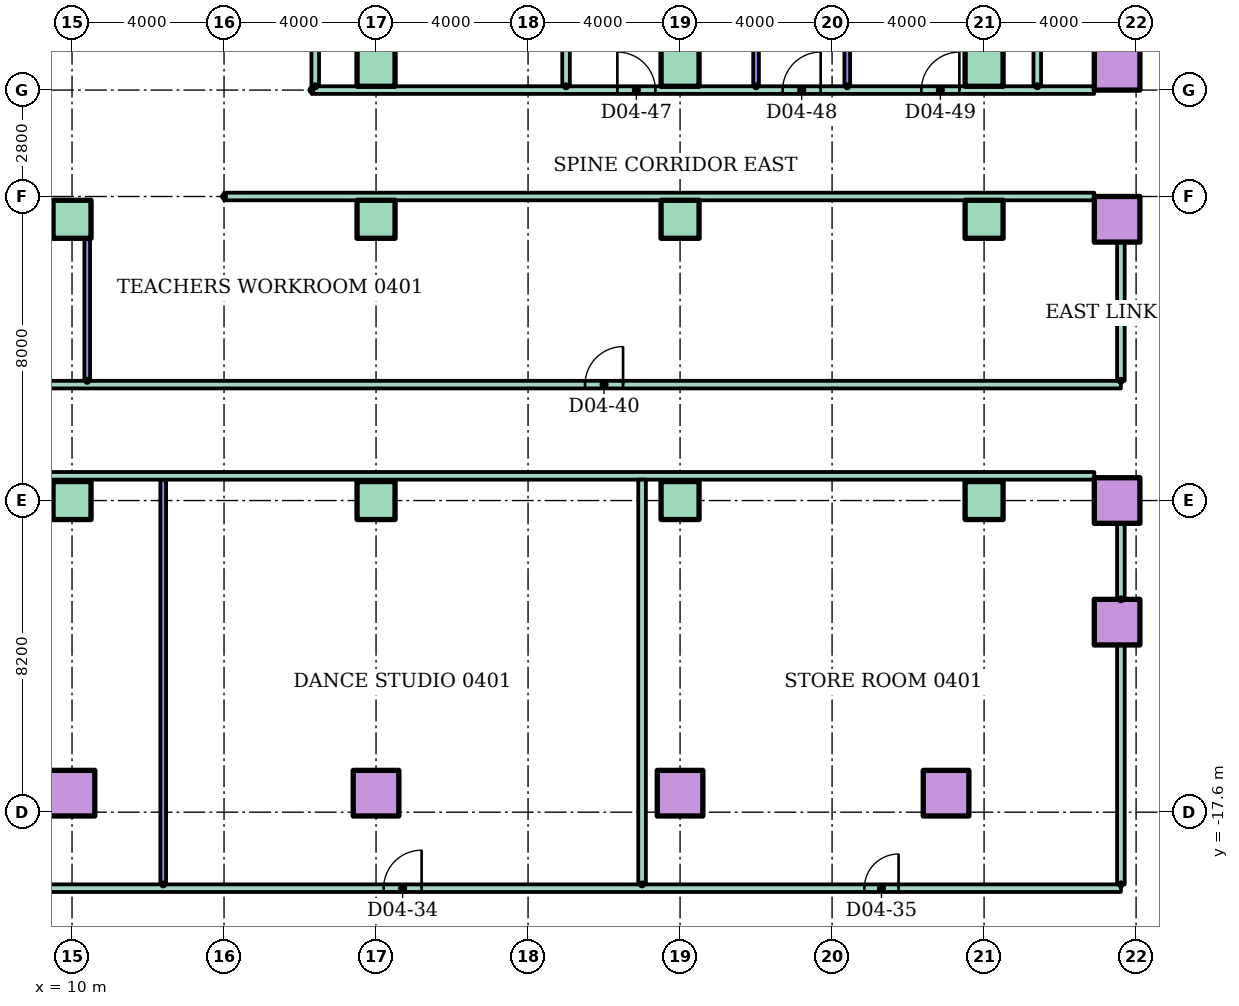
"""IFC4 building model, lengths in metres.
Left out: names, types, materials, properties, quantities, classifications, styles, units other than length and angle.
Written with IfcOpenShell. Run it as: python <this file> out.ifc"""

import sys

from ifc_helpers import new_model, si_unit, direction, frame, frame_2d, origin, origin_2d, place, context, subcontext, project, spatial, rectangle, hollow_rectangle, extrude, element, fill, save


model = new_model("IFC4")
c1 = context("Model", 3, precision=1e-05, world=origin(), true_north=direction((0.0, 1.0)))
c2 = subcontext(c1, "Body", "Model", "MODEL_VIEW")
j1 = project(units=[si_unit("LENGTHUNIT", "METRE"), si_unit("PLANEANGLEUNIT", "RADIAN")], contexts=[c1])
p1 = place(None, origin())
s1 = spatial("IfcSite", under=j1, at=p1, CompositionType="ELEMENT")
p2 = place(p1, origin())
s2 = spatial("IfcBuilding", under=s1, at=p2, CompositionType="ELEMENT")
p3 = place(p2, frame((0.0, 0.0, 18.0)))
s3 = spatial("IfcBuildingStorey", under=s2, at=p3, CompositionType="ELEMENT", Elevation=18.0)
for number, where in (
    (1, (10.0, -17.1, 0.0)),
    (2, (18.0, -17.1, 0.0)),
    (3, (26.0, -17.1, 0.0)),
    (4, (33.0, -17.1, 0.0)),
    (5, (37.5, -12.6, 0.0)),
):
    element("IfcColumn", number, at=place(p3, frame(where)), inside=s3, PredefinedType="COLUMN", context=c2, shape_type="SweptSolid", body=[
        extrude(hollow_rectangle(XDim=1.2, YDim=1.2, WallThickness=0.06, at=origin_2d()), origin(), (0.0, 0.0, 1.0), 4.0),
    ])
for number, where in (
    (6, (10.0, -9.4, 0.0)),
    (7, (18.0, -9.4, 0.0)),
    (8, (26.0, -9.4, 0.0)),
    (9, (34.0, -9.4, 0.0)),
):
    element("IfcColumn", number, at=place(p3, frame(where)), inside=s3, PredefinedType="COLUMN", context=c2, shape_type="SweptSolid", body=[
        extrude(rectangle(XDim=1.0, YDim=1.0, at=origin_2d()), origin(), (0.0, 0.0, 1.0), 4.0),
    ])
p4 = place(p3, frame((37.5, -9.4, 0.0)))
e10 = element("IfcColumn", 10, at=p4, inside=s3, PredefinedType="COLUMN", context=c2, shape_type="SweptSolid", body=[
    extrude(hollow_rectangle(XDim=1.2, YDim=1.2, WallThickness=0.06, at=origin_2d()), origin(), (0.0, 0.0, 1.0), 4.0),
])
for number, where in (
    (11, (10.0, -2.0, 0.0)),
    (12, (18.0, -2.0, 0.0)),
    (13, (26.0, -2.0, 0.0)),
    (14, (34.0, -2.0, 0.0)),
):
    element("IfcColumn", number, at=place(p3, frame(where)), inside=s3, PredefinedType="COLUMN", context=c2, shape_type="SweptSolid", body=[
        extrude(rectangle(XDim=1.0, YDim=1.0, at=origin_2d()), origin(), (0.0, 0.0, 1.0), 4.0),
    ])
p5 = place(p3, frame((37.5, -2.0, 0.0)))
e15 = element("IfcColumn", 15, at=p5, inside=s3, PredefinedType="COLUMN", context=c2, shape_type="SweptSolid", body=[
    extrude(hollow_rectangle(XDim=1.2, YDim=1.2, WallThickness=0.06, at=origin_2d()), origin(), (0.0, 0.0, 1.0), 4.0),
])
for number, where in (
    (16, (18.0, 2.0, 0.0)),
    (17, (26.0, 2.0, 0.0)),
    (18, (34.0, 2.0, 0.0)),
):
    element("IfcColumn", number, at=place(p3, frame(where)), inside=s3, PredefinedType="COLUMN", context=c2, shape_type="SweptSolid", body=[
        extrude(rectangle(XDim=1.0, YDim=1.0, at=origin_2d()), origin(), (0.0, 0.0, 1.0), 4.0),
    ])
p6 = place(p3, frame((37.5, 2.0, 0.0)))
e19 = element("IfcColumn", 19, at=p6, inside=s3, PredefinedType="COLUMN", context=c2, shape_type="SweptSolid", body=[
    extrude(hollow_rectangle(XDim=1.2, YDim=1.2, WallThickness=0.06, at=origin_2d()), origin(), (0.0, 0.0, 1.0), 4.0),
])
p7 = place(p3, frame((-37.6, -19.6, 0.0)))
e20 = element("IfcWall", 20, at=p7, inside=s3, PredefinedType="PARTITIONING", context=c2, shape_type="SweptSolid", body=[
    extrude(rectangle(XDim=75.2, YDim=0.2, at=frame_2d((37.6, 0.0))), origin(), (0.0, 0.0, 1.0), 3.7),
])
p8 = place(p7, frame((2.58, 0.0, 0.0)))
e21 = element("IfcOpeningElement", 21, at=p8, cuts=e20, PredefinedType="OPENING", context=c2, shape_type="SweptSolid", body=[
    extrude(rectangle(XDim=1.0, YDim=2.1, at=frame_2d((0.5, 1.05))), frame((0.0, 0.11, 0.0), z_axis=(0.0, -1.0, 0.0), x_axis=(1.0, 0.0, 0.0)), (0.0, 0.0, 1.0), 0.22),
])
p9 = place(p7, frame((10.42, 0.0, 0.0)))
e22 = element("IfcOpeningElement", 22, at=p9, cuts=e20, PredefinedType="OPENING", context=c2, shape_type="SweptSolid", body=[
    extrude(rectangle(XDim=1.0, YDim=2.1, at=frame_2d((0.5, 1.05))), frame((0.0, 0.11, 0.0), z_axis=(0.0, -1.0, 0.0), x_axis=(1.0, 0.0, 0.0)), (0.0, 0.0, 1.0), 0.22),
])
p10 = place(p7, frame((16.58, 0.0, 0.0)))
e23 = element("IfcOpeningElement", 23, at=p10, cuts=e20, PredefinedType="OPENING", context=c2, shape_type="SweptSolid", body=[
    extrude(rectangle(XDim=1.0, YDim=2.1, at=frame_2d((0.5, 1.05))), frame((0.0, 0.11, 0.0), z_axis=(0.0, -1.0, 0.0), x_axis=(1.0, 0.0, 0.0)), (0.0, 0.0, 1.0), 0.22),
])
p11 = place(p7, frame((24.42, 0.0, 0.0)))
e24 = element("IfcOpeningElement", 24, at=p11, cuts=e20, PredefinedType="OPENING", context=c2, shape_type="SweptSolid", body=[
    extrude(rectangle(XDim=1.0, YDim=2.1, at=frame_2d((0.5, 1.05))), frame((0.0, 0.11, 0.0), z_axis=(0.0, -1.0, 0.0), x_axis=(1.0, 0.0, 0.0)), (0.0, 0.0, 1.0), 0.22),
])
p12 = place(p7, frame((33.0, 0.0, 0.0)))
e25 = element("IfcOpeningElement", 25, at=p12, cuts=e20, PredefinedType="OPENING", context=c2, shape_type="SweptSolid", body=[
    extrude(rectangle(XDim=1.0, YDim=2.1, at=frame_2d((0.5, 1.05))), frame((0.0, 0.11, 0.0), z_axis=(0.0, -1.0, 0.0), x_axis=(1.0, 0.0, 0.0)), (0.0, 0.0, 1.0), 0.22),
])
p13 = place(p7, frame((44.0, 0.0, 0.0)))
e26 = element("IfcOpeningElement", 26, at=p13, cuts=e20, PredefinedType="OPENING", context=c2, shape_type="SweptSolid", body=[
    extrude(rectangle(XDim=1.0, YDim=2.1, at=frame_2d((0.5, 1.05))), frame((0.0, 0.11, 0.0), z_axis=(0.0, -1.0, 0.0), x_axis=(1.0, 0.0, 0.0)), (0.0, 0.0, 1.0), 0.22),
])
p14 = place(p7, frame((55.8, 0.0, 0.0)))
e27 = element("IfcOpeningElement", 27, at=p14, cuts=e20, PredefinedType="OPENING", context=c2, shape_type="SweptSolid", body=[
    extrude(rectangle(XDim=1.0, YDim=2.1, at=frame_2d((0.5, 1.05))), frame((0.0, 0.11, 0.0), z_axis=(0.0, -1.0, 0.0), x_axis=(1.0, 0.0, 0.0)), (0.0, 0.0, 1.0), 0.22),
])
p15 = place(p7, frame((68.45, 0.0, 0.0)))
e28 = element("IfcOpeningElement", 28, at=p15, cuts=e20, PredefinedType="OPENING", context=c2, shape_type="SweptSolid", body=[
    extrude(rectangle(XDim=0.9, YDim=2.1, at=frame_2d((0.45, 1.05))), frame((0.0, 0.11, 0.0), z_axis=(0.0, -1.0, 0.0), x_axis=(1.0, 0.0, 0.0)), (0.0, 0.0, 1.0), 0.22),
])
p16 = place(p3, frame((-36.9, -8.75, 0.0)))
e29 = element("IfcWall", 29, at=p16, inside=s3, PredefinedType="PARTITIONING", context=c2, shape_type="SweptSolid", body=[
    extrude(rectangle(XDim=73.8, YDim=0.2, at=frame_2d((36.9, 0.0))), origin(), (0.0, 0.0, 1.0), 3.7),
])
p17 = place(p3, frame((-37.6, -6.35, 0.0)))
e30 = element("IfcWall", 30, at=p17, inside=s3, PredefinedType="PARTITIONING", context=c2, shape_type="SweptSolid", body=[
    extrude(rectangle(XDim=75.2, YDim=0.2, at=frame_2d((37.6, 0.0))), origin(), (0.0, 0.0, 1.0), 3.7),
])
p18 = place(p17, frame((7.5, 0.0, 0.0)))
e31 = element("IfcOpeningElement", 31, at=p18, cuts=e30, PredefinedType="OPENING", context=c2, shape_type="SweptSolid", body=[
    extrude(rectangle(XDim=1.0, YDim=2.1, at=frame_2d((0.5, 1.05))), frame((0.0, 0.11, 0.0), z_axis=(0.0, -1.0, 0.0), x_axis=(1.0, 0.0, 0.0)), (0.0, 0.0, 1.0), 0.22),
])
p19 = place(p17, frame((20.55, 0.0, 0.0)))
e32 = element("IfcOpeningElement", 32, at=p19, cuts=e30, PredefinedType="OPENING", context=c2, shape_type="SweptSolid", body=[
    extrude(rectangle(XDim=0.9, YDim=2.1, at=frame_2d((0.45, 1.05))), frame((0.0, 0.11, 0.0), z_axis=(0.0, -1.0, 0.0), x_axis=(1.0, 0.0, 0.0)), (0.0, 0.0, 1.0), 0.22),
])
p20 = place(p17, frame((30.55, 0.0, 0.0)))
e33 = element("IfcOpeningElement", 33, at=p20, cuts=e30, PredefinedType="OPENING", context=c2, shape_type="SweptSolid", body=[
    extrude(rectangle(XDim=0.9, YDim=2.1, at=frame_2d((0.45, 1.05))), frame((0.0, 0.11, 0.0), z_axis=(0.0, -1.0, 0.0), x_axis=(1.0, 0.0, 0.0)), (0.0, 0.0, 1.0), 0.22),
])
p21 = place(p17, frame((41.5, 0.0, 0.0)))
e34 = element("IfcOpeningElement", 34, at=p21, cuts=e30, PredefinedType="OPENING", context=c2, shape_type="SweptSolid", body=[
    extrude(rectangle(XDim=1.0, YDim=2.1, at=frame_2d((0.5, 1.05))), frame((0.0, 0.11, 0.0), z_axis=(0.0, -1.0, 0.0), x_axis=(1.0, 0.0, 0.0)), (0.0, 0.0, 1.0), 0.22),
])
p22 = place(p17, frame((61.1, 0.0, 0.0)))
e35 = element("IfcOpeningElement", 35, at=p22, cuts=e30, PredefinedType="OPENING", context=c2, shape_type="SweptSolid", body=[
    extrude(rectangle(XDim=1.0, YDim=2.1, at=frame_2d((0.5, 1.05))), frame((0.0, 0.11, 0.0), z_axis=(0.0, -1.0, 0.0), x_axis=(1.0, 0.0, 0.0)), (0.0, 0.0, 1.0), 0.22),
])
p23 = place(p3, frame((14.0, -1.4, 0.0)))
e36 = element("IfcWall", 36, at=p23, inside=s3, PredefinedType="PARTITIONING", context=c2, shape_type="SweptSolid", body=[
    extrude(rectangle(XDim=22.9, YDim=0.2, at=frame_2d((11.45, 0.0))), origin(), (0.0, 0.0, 1.0), 3.7),
])
p24 = place(p3, frame((16.3, 1.4, 0.0)))
e37 = element("IfcWall", 37, at=p24, inside=s3, PredefinedType="PARTITIONING", context=c2, shape_type="SweptSolid", body=[
    extrude(rectangle(XDim=20.6, YDim=0.2, at=frame_2d((10.3, 0.0))), origin(), (0.0, 0.0, 1.0), 3.7),
])
p25 = place(p24, frame((8.05, 0.0, 0.0)))
e38 = element("IfcOpeningElement", 38, at=p25, cuts=e37, PredefinedType="OPENING", context=c2, shape_type="SweptSolid", body=[
    extrude(rectangle(XDim=1.0, YDim=2.1, at=frame_2d((0.5, 1.05))), frame((0.0, 0.11, 0.0), z_axis=(0.0, -1.0, 0.0), x_axis=(1.0, 0.0, 0.0)), (0.0, 0.0, 1.0), 0.22),
])
p26 = place(p24, frame((12.4, 0.0, 0.0)))
e39 = element("IfcOpeningElement", 39, at=p26, cuts=e37, PredefinedType="OPENING", context=c2, shape_type="SweptSolid", body=[
    extrude(rectangle(XDim=1.0, YDim=2.1, at=frame_2d((0.5, 1.05))), frame((0.0, 0.11, 0.0), z_axis=(0.0, -1.0, 0.0), x_axis=(1.0, 0.0, 0.0)), (0.0, 0.0, 1.0), 0.22),
])
p27 = place(p24, frame((16.05, 0.0, 0.0)))
e40 = element("IfcOpeningElement", 40, at=p27, cuts=e37, PredefinedType="OPENING", context=c2, shape_type="SweptSolid", body=[
    extrude(rectangle(XDim=1.0, YDim=2.1, at=frame_2d((0.5, 1.05))), frame((0.0, 0.11, 0.0), z_axis=(0.0, -1.0, 0.0), x_axis=(1.0, 0.0, 0.0)), (0.0, 0.0, 1.0), 0.22),
])
p28 = place(p3, frame((10.4, -6.25, 0.0), z_axis=(0.0, 0.0, 1.0), x_axis=(0.0, 1.0, 0.0)))
e41 = element("IfcWall", 41, at=p28, inside=s3, PredefinedType="PARTITIONING", context=c2, shape_type="SweptSolid", body=[
    extrude(rectangle(XDim=3.75, YDim=0.15, at=frame_2d((1.875, 0.0))), origin(), (0.0, 0.0, 1.0), 3.7),
])
p29 = place(p3, frame((12.4, -19.5, 0.0), z_axis=(0.0, 0.0, 1.0), x_axis=(0.0, 1.0, 0.0)))
e42 = element("IfcWall", 42, at=p29, inside=s3, PredefinedType="PARTITIONING", context=c2, shape_type="SweptSolid", body=[
    extrude(rectangle(XDim=10.65, YDim=0.15, at=frame_2d((5.325, 0.0))), origin(), (0.0, 0.0, 1.0), 3.7),
])
p30 = place(p3, frame((16.4, 1.5, 0.0), z_axis=(0.0, 0.0, 1.0), x_axis=(0.0, 1.0, 0.0)))
e43 = element("IfcWall", 43, at=p30, inside=s3, PredefinedType="PARTITIONING", context=c2, shape_type="SweptSolid", body=[
    extrude(rectangle(XDim=7.0, YDim=0.2, at=frame_2d((3.5, 0.0))), origin(), (0.0, 0.0, 1.0), 3.7),
])
p31 = place(p30, frame((3.05, 0.0, 0.0)))
e44 = element("IfcOpeningElement", 44, at=p31, cuts=e43, PredefinedType="OPENING", context=c2, shape_type="SweptSolid", body=[
    extrude(rectangle(XDim=0.9, YDim=2.1, at=frame_2d((0.45, 1.05))), frame((0.0, 0.11, 0.0), z_axis=(0.0, -1.0, 0.0), x_axis=(1.0, 0.0, 0.0)), (0.0, 0.0, 1.0), 0.22),
])
p32 = place(p3, frame((23.0, 1.5, 0.0), z_axis=(0.0, 0.0, 1.0), x_axis=(0.0, 1.0, 0.0)))
e45 = element("IfcWall", 45, at=p32, inside=s3, PredefinedType="PARTITIONING", context=c2, shape_type="SweptSolid", body=[
    extrude(rectangle(XDim=7.0, YDim=0.2, at=frame_2d((3.5, 0.0))), origin(), (0.0, 0.0, 1.0), 3.7),
])
p33 = place(p3, frame((25.0, -19.5, 0.0), z_axis=(0.0, 0.0, 1.0), x_axis=(0.0, 1.0, 0.0)))
e46 = element("IfcWall", 46, at=p33, inside=s3, PredefinedType="PARTITIONING", context=c2, shape_type="SweptSolid", body=[
    extrude(rectangle(XDim=10.65, YDim=0.2, at=frame_2d((5.325, 0.0))), origin(), (0.0, 0.0, 1.0), 3.7),
])
for number, where, z_axis, x_axis in (
    (47, (28.0, 1.5, 0.0), (0.0, 0.0, 1.0), (0.0, 1.0, 0.0)),
    (48, (30.4, 1.5, 0.0), (0.0, 0.0, 1.0), (0.0, 1.0, 0.0)),
):
    element("IfcWall", number, at=place(p3, frame(where, z_axis=z_axis, x_axis=x_axis)), inside=s3, PredefinedType="PARTITIONING", context=c2, shape_type="SweptSolid", body=[
        extrude(rectangle(XDim=7.0, YDim=0.15, at=frame_2d((3.5, 0.0))), origin(), (0.0, 0.0, 1.0), 3.7),
    ])
p34 = place(p3, frame((35.4, 1.5, 0.0), z_axis=(0.0, 0.0, 1.0), x_axis=(0.0, 1.0, 0.0)))
e49 = element("IfcWall", 49, at=p34, inside=s3, PredefinedType="PARTITIONING", context=c2, shape_type="SweptSolid", body=[
    extrude(rectangle(XDim=7.0, YDim=0.2, at=frame_2d((3.5, 0.0))), origin(), (0.0, 0.0, 1.0), 3.7),
])
p35 = place(p3, frame((37.6, -19.5, 0.0), z_axis=(0.0, 0.0, 1.0), x_axis=(0.0, 1.0, 0.0)))
e50 = element("IfcWall", 50, at=p35, inside=s3, PredefinedType="PARTITIONING", context=c2, shape_type="SweptSolid", body=[
    extrude(rectangle(XDim=6.3, YDim=0.2, at=frame_2d((3.15, 0.0))), origin(), (0.0, 0.0, 1.0), 3.7),
])
p36 = place(p3, frame((37.6, -12.0, 0.0), z_axis=(0.0, 0.0, 1.0), x_axis=(0.0, 1.0, 0.0)))
e51 = element("IfcWall", 51, at=p36, inside=s3, PredefinedType="PARTITIONING", context=c2, shape_type="SweptSolid", body=[
    extrude(rectangle(XDim=2.0, YDim=0.2, at=frame_2d((1.0, 0.0))), origin(), (0.0, 0.0, 1.0), 3.7),
])
p37 = place(p3, frame((37.6, -6.25, 0.0), z_axis=(0.0, 0.0, 1.0), x_axis=(0.0, 1.0, 0.0)))
e52 = element("IfcWall", 52, at=p37, inside=s3, PredefinedType="PARTITIONING", context=c2, shape_type="SweptSolid", body=[
    extrude(rectangle(XDim=3.65, YDim=0.2, at=frame_2d((1.825, 0.0))), origin(), (0.0, 0.0, 1.0), 3.7),
])
p38 = place(p14, origin())
e53 = element("IfcDoor", 53, at=p38, inside=s3, OperationType="SINGLE_SWING_RIGHT", PredefinedType="DOOR", context=c2, shape_type="SweptSolid", body=[
    extrude(rectangle(XDim=1.0, YDim=2.1, at=frame_2d((0.5, 1.05))), frame((0.0, 0.025, 0.0), z_axis=(0.0, -1.0, 0.0), x_axis=(1.0, 0.0, 0.0)), (0.0, 0.0, 1.0), 0.05),
])
fill(e27, e53)
p39 = place(p15, origin())
e54 = element("IfcDoor", 54, at=p39, inside=s3, OperationType="SINGLE_SWING_RIGHT", PredefinedType="DOOR", context=c2, shape_type="SweptSolid", body=[
    extrude(rectangle(XDim=0.9, YDim=2.1, at=frame_2d((0.45, 1.05))), frame((0.0, 0.025, 0.0), z_axis=(0.0, -1.0, 0.0), x_axis=(1.0, 0.0, 0.0)), (0.0, 0.0, 1.0), 0.05),
])
fill(e28, e54)
p40 = place(p22, origin())
e55 = element("IfcDoor", 55, at=p40, inside=s3, OperationType="SINGLE_SWING_RIGHT", PredefinedType="DOOR", context=c2, shape_type="SweptSolid", body=[
    extrude(rectangle(XDim=1.0, YDim=2.1, at=frame_2d((0.5, 1.05))), frame((0.0, 0.025, 0.0), z_axis=(0.0, -1.0, 0.0), x_axis=(1.0, 0.0, 0.0)), (0.0, 0.0, 1.0), 0.05),
])
fill(e35, e55)
p41 = place(p25, origin())
e56 = element("IfcDoor", 56, at=p41, inside=s3, OperationType="SINGLE_SWING_LEFT", PredefinedType="DOOR", context=c2, shape_type="SweptSolid", body=[
    extrude(rectangle(XDim=1.0, YDim=2.1, at=frame_2d((0.5, 1.05))), frame((0.0, 0.025, 0.0), z_axis=(0.0, -1.0, 0.0), x_axis=(1.0, 0.0, 0.0)), (0.0, 0.0, 1.0), 0.05),
])
fill(e38, e56)
p42 = place(p26, origin())
e57 = element("IfcDoor", 57, at=p42, inside=s3, OperationType="SINGLE_SWING_RIGHT", PredefinedType="DOOR", context=c2, shape_type="SweptSolid", body=[
    extrude(rectangle(XDim=1.0, YDim=2.1, at=frame_2d((0.5, 1.05))), frame((0.0, 0.025, 0.0), z_axis=(0.0, -1.0, 0.0), x_axis=(1.0, 0.0, 0.0)), (0.0, 0.0, 1.0), 0.05),
])
fill(e39, e57)
p43 = place(p27, origin())
e58 = element("IfcDoor", 58, at=p43, inside=s3, OperationType="SINGLE_SWING_RIGHT", PredefinedType="DOOR", context=c2, shape_type="SweptSolid", body=[
    extrude(rectangle(XDim=1.0, YDim=2.1, at=frame_2d((0.5, 1.05))), frame((0.0, 0.025, 0.0), z_axis=(0.0, -1.0, 0.0), x_axis=(1.0, 0.0, 0.0)), (0.0, 0.0, 1.0), 0.05),
])
fill(e40, e58)
save(model, sys.argv[1])
